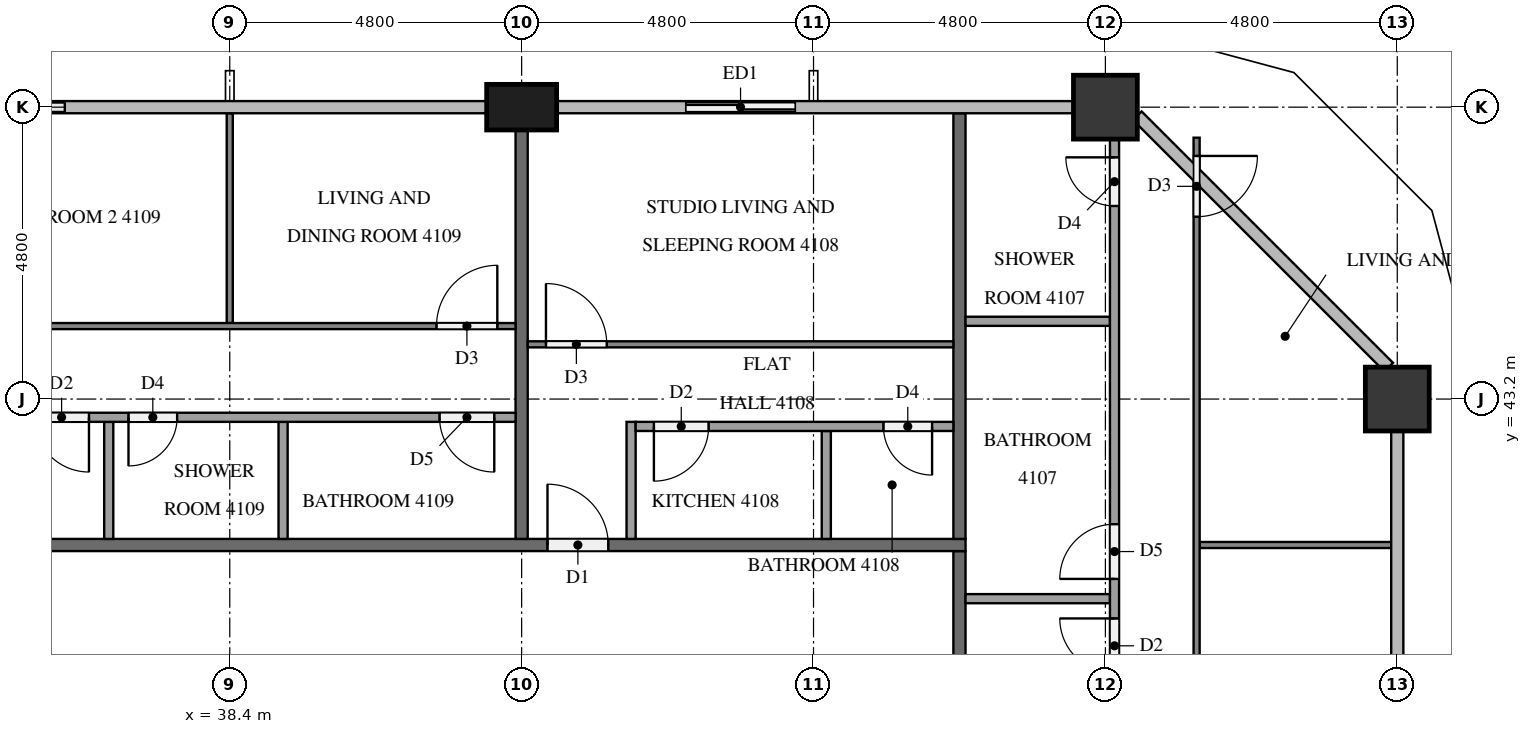
"""IFC4 building model, lengths in metres.
Left out: names, types, materials, properties, quantities, classifications, styles, units other than length and angle.
Written with IfcOpenShell. Run it as: python <this file> out.ifc"""

import sys

from ifc_helpers import new_model, si_unit, direction, frame, frame_2d, origin, origin_2d, place, context, subcontext, project, spatial, rectangle, extrude, element, fill, save


model = new_model("IFC4")
c1 = context("Model", 3, precision=1e-05, world=origin(), true_north=direction((0.0, 1.0)))
c2 = subcontext(c1, "Body", "Model", "MODEL_VIEW")
j1 = project(units=[si_unit("LENGTHUNIT", "METRE"), si_unit("PLANEANGLEUNIT", "RADIAN")], contexts=[c1])
p1 = place(None, origin())
s1 = spatial("IfcSite", under=j1, at=p1, CompositionType="ELEMENT")
p2 = place(p1, origin())
s2 = spatial("IfcBuilding", under=s1, at=p2, CompositionType="ELEMENT")
p3 = place(p2, frame((0.0, 0.0, 159.5)))
s3 = spatial("IfcBuildingStorey", under=s2, at=p3, CompositionType="ELEMENT", Elevation=159.5)
for number, where, z_axis, x_axis in (
    (1, (57.6, 43.2, 0.0), (0.0, 0.0, 1.0), (1.0, 0.0, 0.0)),
    (2, (52.8, 48.0, 0.0), (0.0, 0.0, 1.0), (1.0, 0.0, 0.0)),
):
    element("IfcColumn", number, at=place(p3, frame(where, z_axis=z_axis, x_axis=x_axis)), inside=s3, PredefinedType="COLUMN", context=c2, shape_type="SweptSolid", body=[
        extrude(rectangle(XDim=1.05, YDim=1.05, at=origin_2d()), origin(), (0.0, 0.0, 1.0), 3.2),
    ])
p4 = place(p3, frame((43.2, 48.0, 0.0), z_axis=(0.0, 0.0, 1.0), x_axis=(1.0, 0.0, 0.0)))
e3 = element("IfcColumn", 3, at=p4, inside=s3, PredefinedType="COLUMN", context=c2, shape_type="SweptSolid", body=[
    extrude(rectangle(XDim=1.15, YDim=0.75, at=origin_2d()), origin(), (0.0, 0.0, 1.0), 3.2),
])
p5 = place(p3, frame((48.0, 48.0, 0.0), z_axis=(0.0, 0.0, 1.0), x_axis=(-1.0, 0.0, 0.0)))
e4 = element("IfcWall", 4, at=p5, inside=s3, PredefinedType="SOLIDWALL", context=c2, shape_type="SweptSolid", body=[
    extrude(rectangle(XDim=2.4, YDim=0.15, at=frame_2d((1.2, 0.0))), origin(), (0.0, 0.0, 1.0), 3.2),
])
p6 = place(p5, frame((0.3, 0.0, 0.0)))
e5 = element("IfcOpeningElement", 5, at=p6, cuts=e4, PredefinedType="OPENING", context=c2, shape_type="SweptSolid", body=[
    extrude(rectangle(XDim=1.8, YDim=2.4, at=frame_2d((0.9, 1.2))), frame((0.0, 0.085, 0.0), z_axis=(0.0, -1.0, 0.0), x_axis=(1.0, 0.0, 0.0)), (0.0, 0.0, 1.0), 0.17),
])
p7 = place(p3, frame((36.0, 48.0, 0.0), z_axis=(0.0, 0.0, 1.0), x_axis=(-1.0, 0.0, 0.0)))
e6 = element("IfcWall", 6, at=p7, inside=s3, PredefinedType="SOLIDWALL", context=c2, shape_type="SweptSolid", body=[
    extrude(rectangle(XDim=1.825, YDim=0.15, at=frame_2d((0.913, 0.0))), origin(), (0.0, 0.0, 1.0), 3.2),
])
p8 = place(p7, frame((0.312, 0.0, 0.9)))
e7 = element("IfcOpeningElement", 7, at=p8, cuts=e6, PredefinedType="OPENING", context=c2, shape_type="SweptSolid", body=[
    extrude(rectangle(XDim=1.2, YDim=1.4, at=frame_2d((0.6, 0.7))), frame((0.0, 0.085, 0.0), z_axis=(0.0, -1.0, 0.0), x_axis=(1.0, 0.0, 0.0)), (0.0, 0.0, 1.0), 0.17),
])
p9 = place(p3, frame((50.4, 40.7, 0.0), z_axis=(0.0, 0.0, 1.0), x_axis=(0.0, -1.0, 0.0)))
e8 = element("IfcWall", 8, at=p9, inside=s3, PredefinedType="PARTITIONING", context=c2, shape_type="SweptSolid", body=[
    extrude(rectangle(XDim=28.6, YDim=0.2, at=frame_2d((14.3, 0.0))), origin(), (0.0, 0.0, 1.0), 3.2),
])
p10 = place(p9, frame((19.525, 0.0, 0.0)))
e9 = element("IfcOpeningElement", 9, at=p10, cuts=e8, PredefinedType="OPENING", context=c2, shape_type="SweptSolid", body=[
    extrude(rectangle(XDim=1.0, YDim=2.1, at=frame_2d((0.5, 1.05))), frame((0.0, 0.11, 0.0), z_axis=(0.0, -1.0, 0.0), x_axis=(1.0, 0.0, 0.0)), (0.0, 0.0, 1.0), 0.22),
])
p11 = place(p9, frame((17.675, 0.0, 0.0)))
e10 = element("IfcOpeningElement", 10, at=p11, cuts=e8, PredefinedType="OPENING", context=c2, shape_type="SweptSolid", body=[
    extrude(rectangle(XDim=1.0, YDim=2.1, at=frame_2d((0.5, 1.05))), frame((0.0, 0.11, 0.0), z_axis=(0.0, -1.0, 0.0), x_axis=(1.0, 0.0, 0.0)), (0.0, 0.0, 1.0), 0.22),
])
p12 = place(p9, frame((8.075, 0.0, 0.0)))
e11 = element("IfcOpeningElement", 11, at=p12, cuts=e8, PredefinedType="OPENING", context=c2, shape_type="SweptSolid", body=[
    extrude(rectangle(XDim=1.0, YDim=2.1, at=frame_2d((0.5, 1.05))), frame((0.0, 0.11, 0.0), z_axis=(0.0, -1.0, 0.0), x_axis=(1.0, 0.0, 0.0)), (0.0, 0.0, 1.0), 0.22),
])
p13 = place(p3, frame((11.9, 40.8, 0.0), z_axis=(0.0, 0.0, 1.0), x_axis=(1.0, 0.0, 0.0)))
e12 = element("IfcWall", 12, at=p13, inside=s3, PredefinedType="PARTITIONING", context=c2, shape_type="SweptSolid", body=[
    extrude(rectangle(XDim=38.6, YDim=0.2, at=frame_2d((19.3, 0.0))), origin(), (0.0, 0.0, 1.0), 3.2),
])
p14 = place(p13, frame((31.725, 0.0, 0.0)))
e13 = element("IfcOpeningElement", 13, at=p14, cuts=e12, PredefinedType="OPENING", context=c2, shape_type="SweptSolid", body=[
    extrude(rectangle(XDim=1.0, YDim=2.1, at=frame_2d((0.5, 1.05))), frame((0.0, 0.11, 0.0), z_axis=(0.0, -1.0, 0.0), x_axis=(1.0, 0.0, 0.0)), (0.0, 0.0, 1.0), 0.22),
])
p15 = place(p13, frame((17.325, 0.0, 0.0)))
e14 = element("IfcOpeningElement", 14, at=p15, cuts=e12, PredefinedType="OPENING", context=c2, shape_type="SweptSolid", body=[
    extrude(rectangle(XDim=1.0, YDim=2.1, at=frame_2d((0.5, 1.05))), frame((0.0, 0.11, 0.0), z_axis=(0.0, -1.0, 0.0), x_axis=(1.0, 0.0, 0.0)), (0.0, 0.0, 1.0), 0.22),
])
p16 = place(p13, frame((0.525, 0.0, 0.0)))
e15 = element("IfcOpeningElement", 15, at=p16, cuts=e12, PredefinedType="OPENING", context=c2, shape_type="SweptSolid", body=[
    extrude(rectangle(XDim=1.0, YDim=2.1, at=frame_2d((0.5, 1.05))), frame((0.0, 0.11, 0.0), z_axis=(0.0, -1.0, 0.0), x_axis=(1.0, 0.0, 0.0)), (0.0, 0.0, 1.0), 0.22),
])
p17 = place(p3, frame((50.4, 40.9, 0.0), z_axis=(0.0, 0.0, 1.0), x_axis=(0.0, 1.0, 0.0)))
e16 = element("IfcWall", 16, at=p17, inside=s3, PredefinedType="PARTITIONING", context=c2, shape_type="SweptSolid", body=[
    extrude(rectangle(XDim=7.0, YDim=0.2, at=frame_2d((3.5, 0.0))), origin(), (0.0, 0.0, 1.0), 3.2),
])
p18 = place(p3, frame((43.2, 47.625, 0.0), z_axis=(0.0, 0.0, 1.0), x_axis=(0.0, -1.0, 0.0)))
e17 = element("IfcWall", 17, at=p18, inside=s3, PredefinedType="PARTITIONING", context=c2, shape_type="SweptSolid", body=[
    extrude(rectangle(XDim=6.725, YDim=0.2, at=frame_2d((3.363, 0.0))), origin(), (0.0, 0.0, 1.0), 3.2),
])
p19 = place(p3, frame((54.35, 40.8, 0.0), z_axis=(0.0, 0.0, 1.0), x_axis=(1.0, 0.0, 0.0)))
e18 = element("IfcWall", 18, at=p19, inside=s3, PredefinedType="PARTITIONING", context=c2, shape_type="SweptSolid", body=[
    extrude(rectangle(XDim=3.15, YDim=0.1, at=frame_2d((1.575, 0.0))), origin(), (0.0, 0.0, 1.0), 3.2),
])
p20 = place(p3, frame((54.3, 47.498, 0.0), z_axis=(0.0, 0.0, 1.0), x_axis=(0.0, -1.0, 0.0)))
e19 = element("IfcWall", 19, at=p20, inside=s3, PredefinedType="PARTITIONING", context=c2, shape_type="SweptSolid", body=[
    extrude(rectangle(XDim=16.198, YDim=0.1, at=frame_2d((8.099, 0.0))), origin(), (0.0, 0.0, 1.0), 3.2),
])
p21 = place(p20, frame((11.848, 0.0, 0.0)))
e20 = element("IfcOpeningElement", 20, at=p21, cuts=e19, PredefinedType="OPENING", context=c2, shape_type="SweptSolid", body=[
    extrude(rectangle(XDim=0.9, YDim=2.1, at=frame_2d((0.45, 1.05))), frame((0.0, 0.06, 0.0), z_axis=(0.0, -1.0, 0.0), x_axis=(1.0, 0.0, 0.0)), (0.0, 0.0, 1.0), 0.12),
])
p22 = place(p20, frame((10.248, 0.0, 0.0)))
e21 = element("IfcOpeningElement", 21, at=p22, cuts=e19, PredefinedType="OPENING", context=c2, shape_type="SweptSolid", body=[
    extrude(rectangle(XDim=0.9, YDim=2.1, at=frame_2d((0.45, 1.05))), frame((0.0, 0.06, 0.0), z_axis=(0.0, -1.0, 0.0), x_axis=(1.0, 0.0, 0.0)), (0.0, 0.0, 1.0), 0.12),
])
p23 = place(p20, frame((0.3, 0.0, 0.0)))
e22 = element("IfcOpeningElement", 22, at=p23, cuts=e19, PredefinedType="OPENING", context=c2, shape_type="SweptSolid", body=[
    extrude(rectangle(XDim=1.0, YDim=2.1, at=frame_2d((0.5, 1.05))), frame((0.0, 0.06, 0.0), z_axis=(0.0, -1.0, 0.0), x_axis=(1.0, 0.0, 0.0)), (0.0, 0.0, 1.0), 0.12),
])
for number, where, z_axis, x_axis in (
    (23, (50.5, 39.917, 0.0), (0.0, 0.0, 1.0), (1.0, 0.0, 0.0)),
    (24, (50.5, 44.479, 0.0), (0.0, 0.0, 1.0), (1.0, 0.0, 0.0)),
):
    element("IfcWall", number, at=place(p3, frame(where, z_axis=z_axis, x_axis=x_axis)), inside=s3, PredefinedType="PARTITIONING", context=c2, shape_type="SweptSolid", body=[
        extrude(rectangle(XDim=2.375, YDim=0.15, at=frame_2d((1.188, 0.0))), origin(), (0.0, 0.0, 1.0), 3.2),
    ])
p24 = place(p3, frame((52.95, 33.075, 0.0), z_axis=(0.0, 0.0, 1.0), x_axis=(0.0, 1.0, 0.0)))
e25 = element("IfcWall", 25, at=p24, inside=s3, PredefinedType="PARTITIONING", context=c2, shape_type="SweptSolid", body=[
    extrude(rectangle(XDim=14.4, YDim=0.15, at=frame_2d((7.2, 0.0))), origin(), (0.0, 0.0, 1.0), 3.2),
])
p25 = place(p24, frame((5.617, 0.0, 0.0)))
e26 = element("IfcOpeningElement", 26, at=p25, cuts=e25, PredefinedType="OPENING", context=c2, shape_type="SweptSolid", body=[
    extrude(rectangle(XDim=0.9, YDim=2.1, at=frame_2d((0.45, 1.05))), frame((0.0, 0.085, 0.0), z_axis=(0.0, -1.0, 0.0), x_axis=(1.0, 0.0, 0.0)), (0.0, 0.0, 1.0), 0.17),
])
p26 = place(p24, frame((7.167, 0.0, 0.0)))
e27 = element("IfcOpeningElement", 27, at=p26, cuts=e25, PredefinedType="OPENING", context=c2, shape_type="SweptSolid", body=[
    extrude(rectangle(XDim=0.9, YDim=2.1, at=frame_2d((0.45, 1.05))), frame((0.0, 0.085, 0.0), z_axis=(0.0, -1.0, 0.0), x_axis=(1.0, 0.0, 0.0)), (0.0, 0.0, 1.0), 0.17),
])
p27 = place(p24, frame((13.3, 0.0, 0.0)))
e28 = element("IfcOpeningElement", 28, at=p27, cuts=e25, PredefinedType="OPENING", context=c2, shape_type="SweptSolid", body=[
    extrude(rectangle(XDim=0.8, YDim=2.1, at=frame_2d((0.4, 1.05))), frame((0.0, 0.085, 0.0), z_axis=(0.0, -1.0, 0.0), x_axis=(1.0, 0.0, 0.0)), (0.0, 0.0, 1.0), 0.17),
])
p28 = place(p3, frame((43.3, 44.1, 0.0), z_axis=(0.0, 0.0, 1.0), x_axis=(1.0, 0.0, 0.0)))
e29 = element("IfcWall", 29, at=p28, inside=s3, PredefinedType="PARTITIONING", context=c2, shape_type="SweptSolid", body=[
    extrude(rectangle(XDim=7.0, YDim=0.1, at=frame_2d((3.5, 0.0))), origin(), (0.0, 0.0, 1.0), 3.2),
])
p29 = place(p28, frame((0.3, 0.0, 0.0)))
e30 = element("IfcOpeningElement", 30, at=p29, cuts=e29, PredefinedType="OPENING", context=c2, shape_type="SweptSolid", body=[
    extrude(rectangle(XDim=1.0, YDim=2.1, at=frame_2d((0.5, 1.05))), frame((0.0, 0.06, 0.0), z_axis=(0.0, -1.0, 0.0), x_axis=(1.0, 0.0, 0.0)), (0.0, 0.0, 1.0), 0.12),
])
p30 = place(p3, frame((48.21, 40.9, 0.0), z_axis=(0.0, 0.0, 1.0), x_axis=(0.0, 1.0, 0.0)))
e31 = element("IfcWall", 31, at=p30, inside=s3, PredefinedType="PARTITIONING", context=c2, shape_type="SweptSolid", body=[
    extrude(rectangle(XDim=1.775, YDim=0.15, at=frame_2d((0.888, 0.0))), origin(), (0.0, 0.0, 1.0), 3.2),
])
p31 = place(p3, frame((45.0, 40.9, 0.0), z_axis=(0.0, 0.0, 1.0), x_axis=(0.0, 1.0, 0.0)))
e32 = element("IfcWall", 32, at=p31, inside=s3, PredefinedType="PARTITIONING", context=c2, shape_type="SweptSolid", body=[
    extrude(rectangle(XDim=1.925, YDim=0.15, at=frame_2d((0.962, 0.0))), origin(), (0.0, 0.0, 1.0), 3.2),
])
p32 = place(p3, frame((50.3, 42.75, 0.0), z_axis=(0.0, 0.0, 1.0), x_axis=(-1.0, 0.0, 0.0)))
e33 = element("IfcWall", 33, at=p32, inside=s3, PredefinedType="PARTITIONING", context=c2, shape_type="SweptSolid", body=[
    extrude(rectangle(XDim=5.225, YDim=0.15, at=frame_2d((2.613, 0.0))), origin(), (0.0, 0.0, 1.0), 3.2),
])
p33 = place(p32, frame((4.025, 0.0, 0.0)))
e34 = element("IfcOpeningElement", 34, at=p33, cuts=e33, PredefinedType="OPENING", context=c2, shape_type="SweptSolid", body=[
    extrude(rectangle(XDim=0.9, YDim=2.1, at=frame_2d((0.45, 1.05))), frame((0.0, 0.085, 0.0), z_axis=(0.0, -1.0, 0.0), x_axis=(1.0, 0.0, 0.0)), (0.0, 0.0, 1.0), 0.17),
])
p34 = place(p32, frame((0.35, 0.0, 0.0)))
e35 = element("IfcOpeningElement", 35, at=p34, cuts=e33, PredefinedType="OPENING", context=c2, shape_type="SweptSolid", body=[
    extrude(rectangle(XDim=0.8, YDim=2.1, at=frame_2d((0.4, 1.05))), frame((0.0, 0.085, 0.0), z_axis=(0.0, -1.0, 0.0), x_axis=(1.0, 0.0, 0.0)), (0.0, 0.0, 1.0), 0.17),
])
p35 = place(p3, frame((38.4, 44.45, 0.0), z_axis=(0.0, 0.0, 1.0), x_axis=(0.0, 1.0, 0.0)))
e36 = element("IfcWall", 36, at=p35, inside=s3, PredefinedType="PARTITIONING", context=c2, shape_type="SweptSolid", body=[
    extrude(rectangle(XDim=3.45, YDim=0.1, at=frame_2d((1.725, 0.0))), origin(), (0.0, 0.0, 1.0), 3.2),
])
p36 = place(p3, frame((28.9, 44.4, 0.0), z_axis=(0.0, 0.0, 1.0), x_axis=(1.0, 0.0, 0.0)))
e37 = element("IfcWall", 37, at=p36, inside=s3, PredefinedType="PARTITIONING", context=c2, shape_type="SweptSolid", body=[
    extrude(rectangle(XDim=14.2, YDim=0.1, at=frame_2d((7.1, 0.0))), origin(), (0.0, 0.0, 1.0), 3.2),
])
p37 = place(p36, frame((3.45, 0.0, 0.0)))
e38 = element("IfcOpeningElement", 38, at=p37, cuts=e37, PredefinedType="OPENING", context=c2, shape_type="SweptSolid", body=[
    extrude(rectangle(XDim=0.9, YDim=2.1, at=frame_2d((0.45, 1.05))), frame((0.0, 0.06, 0.0), z_axis=(0.0, -1.0, 0.0), x_axis=(1.0, 0.0, 0.0)), (0.0, 0.0, 1.0), 0.12),
])
p38 = place(p36, frame((5.05, 0.0, 0.0)))
e39 = element("IfcOpeningElement", 39, at=p38, cuts=e37, PredefinedType="OPENING", context=c2, shape_type="SweptSolid", body=[
    extrude(rectangle(XDim=0.9, YDim=2.1, at=frame_2d((0.45, 1.05))), frame((0.0, 0.06, 0.0), z_axis=(0.0, -1.0, 0.0), x_axis=(1.0, 0.0, 0.0)), (0.0, 0.0, 1.0), 0.12),
])
p39 = place(p36, frame((12.9, 0.0, 0.0)))
e40 = element("IfcOpeningElement", 40, at=p39, cuts=e37, PredefinedType="OPENING", context=c2, shape_type="SweptSolid", body=[
    extrude(rectangle(XDim=1.0, YDim=2.1, at=frame_2d((0.5, 1.05))), frame((0.0, 0.06, 0.0), z_axis=(0.0, -1.0, 0.0), x_axis=(1.0, 0.0, 0.0)), (0.0, 0.0, 1.0), 0.12),
])
for number, where, z_axis, x_axis in (
    (41, (36.41, 40.9, 0.0), (0.0, 0.0, 1.0), (0.0, 1.0, 0.0)),
    (42, (39.277, 40.9, 0.0), (0.0, 0.0, 1.0), (0.0, 1.0, 0.0)),
):
    element("IfcWall", number, at=place(p3, frame(where, z_axis=z_axis, x_axis=x_axis)), inside=s3, PredefinedType="PARTITIONING", context=c2, shape_type="SweptSolid", body=[
        extrude(rectangle(XDim=1.925, YDim=0.15, at=frame_2d((0.962, 0.0))), origin(), (0.0, 0.0, 1.0), 3.2),
    ])
p40 = place(p3, frame((43.1, 42.9, 0.0), z_axis=(0.0, 0.0, 1.0), x_axis=(-1.0, 0.0, 0.0)))
e43 = element("IfcWall", 43, at=p40, inside=s3, PredefinedType="PARTITIONING", context=c2, shape_type="SweptSolid", body=[
    extrude(rectangle(XDim=12.425, YDim=0.15, at=frame_2d((6.212, 0.0))), origin(), (0.0, 0.0, 1.0), 3.2),
])
p41 = place(p40, frame((7.015, 0.0, 0.0)))
e44 = element("IfcOpeningElement", 44, at=p41, cuts=e43, PredefinedType="OPENING", context=c2, shape_type="SweptSolid", body=[
    extrude(rectangle(XDim=0.9, YDim=2.1, at=frame_2d((0.45, 1.05))), frame((0.0, 0.085, 0.0), z_axis=(0.0, -1.0, 0.0), x_axis=(1.0, 0.0, 0.0)), (0.0, 0.0, 1.0), 0.17),
])
p42 = place(p40, frame((5.565, 0.0, 0.0)))
e45 = element("IfcOpeningElement", 45, at=p42, cuts=e43, PredefinedType="OPENING", context=c2, shape_type="SweptSolid", body=[
    extrude(rectangle(XDim=0.8, YDim=2.1, at=frame_2d((0.4, 1.05))), frame((0.0, 0.085, 0.0), z_axis=(0.0, -1.0, 0.0), x_axis=(1.0, 0.0, 0.0)), (0.0, 0.0, 1.0), 0.17),
])
p43 = place(p40, frame((0.35, 0.0, 0.0)))
e46 = element("IfcOpeningElement", 46, at=p43, cuts=e43, PredefinedType="OPENING", context=c2, shape_type="SweptSolid", body=[
    extrude(rectangle(XDim=0.9, YDim=2.1, at=frame_2d((0.45, 1.05))), frame((0.0, 0.085, 0.0), z_axis=(0.0, -1.0, 0.0), x_axis=(1.0, 0.0, 0.0)), (0.0, 0.0, 1.0), 0.17),
])
p44 = place(p6, origin())
e47 = element("IfcDoor", 47, at=p44, inside=s3, OperationType="SLIDING_TO_LEFT", PredefinedType="DOOR", context=c2, shape_type="SweptSolid", body=[
    extrude(rectangle(XDim=1.8, YDim=2.4, at=frame_2d((0.9, 1.2))), frame((0.0, 0.025, 0.0), z_axis=(0.0, -1.0, 0.0), x_axis=(1.0, 0.0, 0.0)), (0.0, 0.0, 1.0), 0.05),
])
fill(e5, e47)
p45 = place(p8, origin())
e48 = element("IfcWindow", 48, at=p45, inside=s3, PartitioningType="SINGLE_PANEL", PredefinedType="WINDOW", context=c2, shape_type="SweptSolid", body=[
    extrude(rectangle(XDim=1.2, YDim=1.4, at=frame_2d((0.6, 0.7))), frame((0.0, 0.03, 0.0), z_axis=(0.0, -1.0, 0.0), x_axis=(1.0, 0.0, 0.0)), (0.0, 0.0, 1.0), 0.06),
])
fill(e7, e48)
p46 = place(p14, origin())
e49 = element("IfcDoor", 49, at=p46, inside=s3, OperationType="SINGLE_SWING_LEFT", PredefinedType="DOOR", context=c2, shape_type="SweptSolid", body=[
    extrude(rectangle(XDim=1.0, YDim=2.1, at=frame_2d((0.5, 1.05))), frame((0.0, 0.025, 0.0), z_axis=(0.0, -1.0, 0.0), x_axis=(1.0, 0.0, 0.0)), (0.0, 0.0, 1.0), 0.05),
])
fill(e13, e49)
p47 = place(p23, origin())
e50 = element("IfcDoor", 50, at=p47, inside=s3, OperationType="SINGLE_SWING_LEFT", PredefinedType="DOOR", context=c2, shape_type="SweptSolid", body=[
    extrude(rectangle(XDim=1.0, YDim=2.1, at=frame_2d((0.5, 1.05))), frame((0.0, 0.025, 0.0), z_axis=(0.0, -1.0, 0.0), x_axis=(1.0, 0.0, 0.0)), (0.0, 0.0, 1.0), 0.05),
])
fill(e22, e50)
p48 = place(p25, origin())
e51 = element("IfcDoor", 51, at=p48, inside=s3, OperationType="SINGLE_SWING_RIGHT", PredefinedType="DOOR", context=c2, shape_type="SweptSolid", body=[
    extrude(rectangle(XDim=0.9, YDim=2.1, at=frame_2d((0.45, 1.05))), frame((0.0, 0.025, 0.0), z_axis=(0.0, -1.0, 0.0), x_axis=(1.0, 0.0, 0.0)), (0.0, 0.0, 1.0), 0.05),
])
fill(e26, e51)
p49 = place(p26, origin())
e52 = element("IfcDoor", 52, at=p49, inside=s3, OperationType="SINGLE_SWING_LEFT", PredefinedType="DOOR", context=c2, shape_type="SweptSolid", body=[
    extrude(rectangle(XDim=0.9, YDim=2.1, at=frame_2d((0.45, 1.05))), frame((0.0, 0.025, 0.0), z_axis=(0.0, -1.0, 0.0), x_axis=(1.0, 0.0, 0.0)), (0.0, 0.0, 1.0), 0.05),
])
fill(e27, e52)
p50 = place(p27, origin())
e53 = element("IfcDoor", 53, at=p50, inside=s3, OperationType="SINGLE_SWING_RIGHT", PredefinedType="DOOR", context=c2, shape_type="SweptSolid", body=[
    extrude(rectangle(XDim=0.8, YDim=2.1, at=frame_2d((0.4, 1.05))), frame((0.0, 0.025, 0.0), z_axis=(0.0, -1.0, 0.0), x_axis=(1.0, 0.0, 0.0)), (0.0, 0.0, 1.0), 0.05),
])
fill(e28, e53)
p51 = place(p29, origin())
e54 = element("IfcDoor", 54, at=p51, inside=s3, OperationType="SINGLE_SWING_LEFT", PredefinedType="DOOR", context=c2, shape_type="SweptSolid", body=[
    extrude(rectangle(XDim=1.0, YDim=2.1, at=frame_2d((0.5, 1.05))), frame((0.0, 0.025, 0.0), z_axis=(0.0, -1.0, 0.0), x_axis=(1.0, 0.0, 0.0)), (0.0, 0.0, 1.0), 0.05),
])
fill(e30, e54)
p52 = place(p33, origin())
e55 = element("IfcDoor", 55, at=p52, inside=s3, OperationType="SINGLE_SWING_RIGHT", PredefinedType="DOOR", context=c2, shape_type="SweptSolid", body=[
    extrude(rectangle(XDim=0.9, YDim=2.1, at=frame_2d((0.45, 1.05))), frame((0.0, 0.025, 0.0), z_axis=(0.0, -1.0, 0.0), x_axis=(1.0, 0.0, 0.0)), (0.0, 0.0, 1.0), 0.05),
])
fill(e34, e55)
p53 = place(p34, origin())
e56 = element("IfcDoor", 56, at=p53, inside=s3, OperationType="SINGLE_SWING_LEFT", PredefinedType="DOOR", context=c2, shape_type="SweptSolid", body=[
    extrude(rectangle(XDim=0.8, YDim=2.1, at=frame_2d((0.4, 1.05))), frame((0.0, 0.025, 0.0), z_axis=(0.0, -1.0, 0.0), x_axis=(1.0, 0.0, 0.0)), (0.0, 0.0, 1.0), 0.05),
])
fill(e35, e56)
p54 = place(p39, origin())
e57 = element("IfcDoor", 57, at=p54, inside=s3, OperationType="SINGLE_SWING_RIGHT", PredefinedType="DOOR", context=c2, shape_type="SweptSolid", body=[
    extrude(rectangle(XDim=1.0, YDim=2.1, at=frame_2d((0.5, 1.05))), frame((0.0, 0.025, 0.0), z_axis=(0.0, -1.0, 0.0), x_axis=(1.0, 0.0, 0.0)), (0.0, 0.0, 1.0), 0.05),
])
fill(e40, e57)
p55 = place(p41, origin())
e58 = element("IfcDoor", 58, at=p55, inside=s3, OperationType="SINGLE_SWING_LEFT", PredefinedType="DOOR", context=c2, shape_type="SweptSolid", body=[
    extrude(rectangle(XDim=0.9, YDim=2.1, at=frame_2d((0.45, 1.05))), frame((0.0, 0.025, 0.0), z_axis=(0.0, -1.0, 0.0), x_axis=(1.0, 0.0, 0.0)), (0.0, 0.0, 1.0), 0.05),
])
fill(e44, e58)
p56 = place(p42, origin())
e59 = element("IfcDoor", 59, at=p56, inside=s3, OperationType="SINGLE_SWING_RIGHT", PredefinedType="DOOR", context=c2, shape_type="SweptSolid", body=[
    extrude(rectangle(XDim=0.8, YDim=2.1, at=frame_2d((0.4, 1.05))), frame((0.0, 0.025, 0.0), z_axis=(0.0, -1.0, 0.0), x_axis=(1.0, 0.0, 0.0)), (0.0, 0.0, 1.0), 0.05),
])
fill(e45, e59)
p57 = place(p43, origin())
e60 = element("IfcDoor", 60, at=p57, inside=s3, OperationType="SINGLE_SWING_LEFT", PredefinedType="DOOR", context=c2, shape_type="SweptSolid", body=[
    extrude(rectangle(XDim=0.9, YDim=2.1, at=frame_2d((0.45, 1.05))), frame((0.0, 0.025, 0.0), z_axis=(0.0, -1.0, 0.0), x_axis=(1.0, 0.0, 0.0)), (0.0, 0.0, 1.0), 0.05),
])
fill(e46, e60)
save(model, sys.argv[1])
